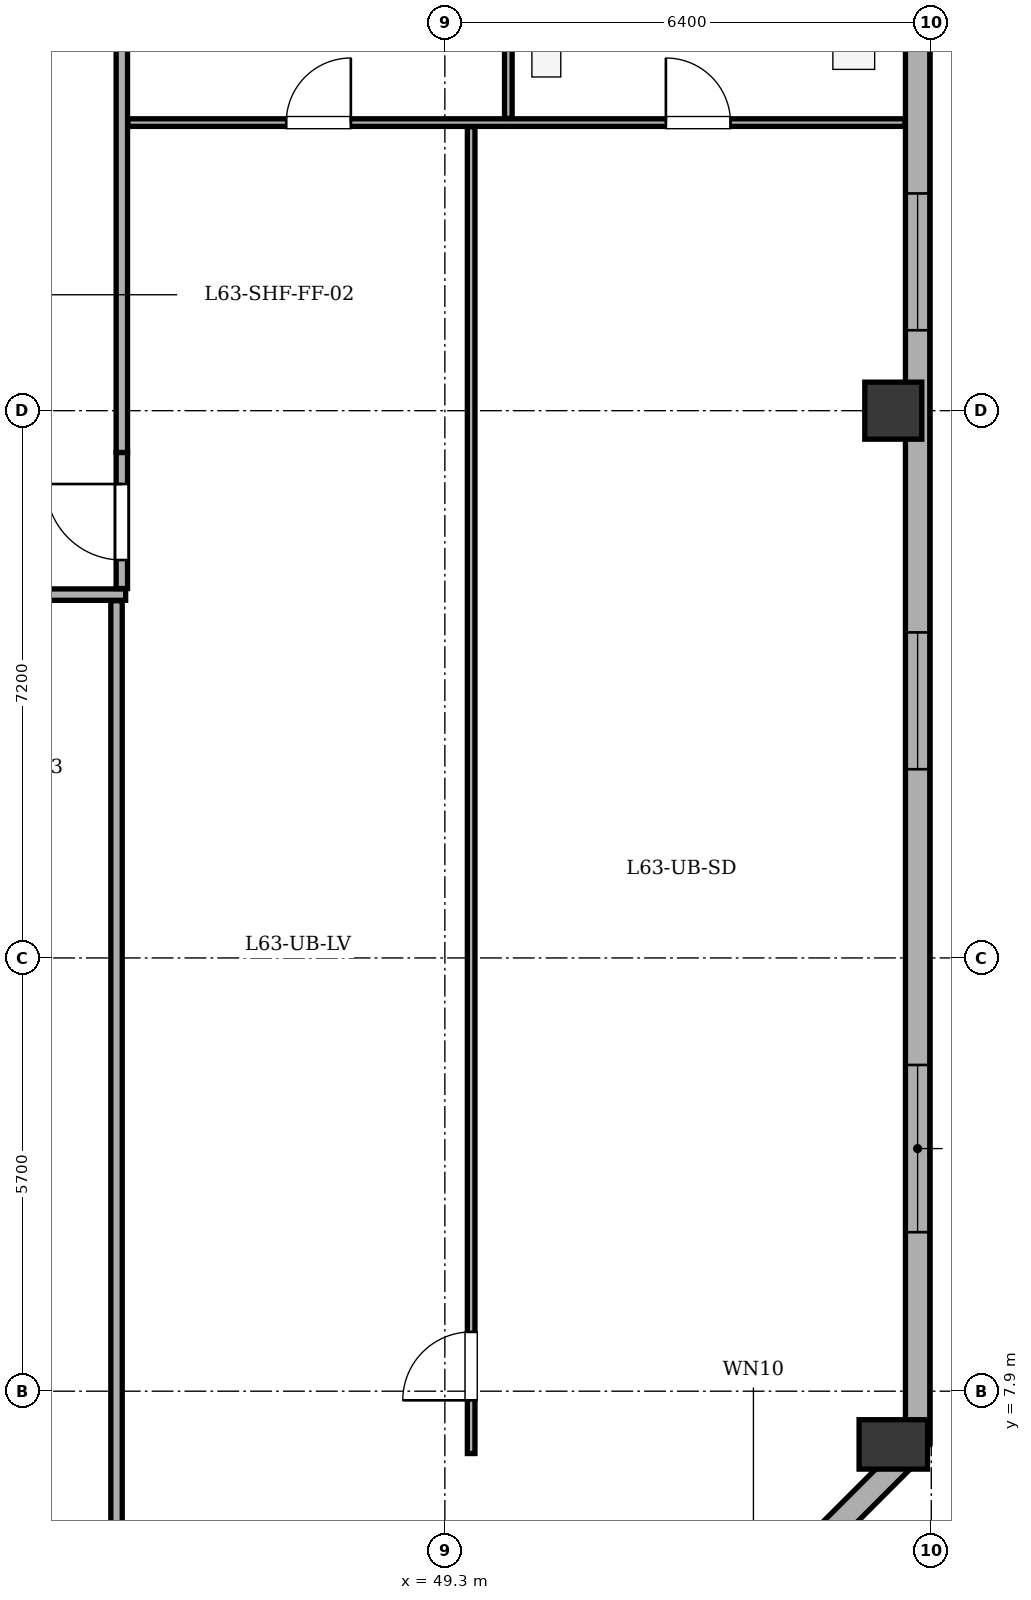
"""IFC4 building model, lengths in metres.
Left out: names, types, materials, properties, quantities, classifications, styles, units other than length and angle.
Written with IfcOpenShell. Run it as: python <this file> out.ifc"""

import sys

from ifc_helpers import new_model, si_unit, direction, frame, frame_2d, origin, origin_2d, place, context, subcontext, project, spatial, rectangle, extrude, element, fill, save


model = new_model("IFC4")
c1 = context("Model", 3, precision=1e-05, world=origin(), true_north=direction((0.0, 1.0)))
c2 = subcontext(c1, "Body", "Model", "MODEL_VIEW")
j1 = project(units=[si_unit("LENGTHUNIT", "METRE"), si_unit("PLANEANGLEUNIT", "RADIAN")], contexts=[c1])
p1 = place(None, origin())
s1 = spatial("IfcSite", under=j1, at=p1, CompositionType="ELEMENT")
p2 = place(p1, origin())
s2 = spatial("IfcBuilding", under=s1, at=p2, CompositionType="ELEMENT")
p3 = place(p2, frame((0.0, 0.0, 241.5)))
s3 = spatial("IfcBuildingStorey", under=s2, at=p3, CompositionType="ELEMENT", Elevation=241.5)
p4 = place(p3, frame((55.2, 7.2, 0.0), z_axis=(0.0, 0.0, 1.0), x_axis=(1.0, 0.0, 0.0)))
e1 = element("IfcColumn", 1, at=p4, inside=s3, PredefinedType="COLUMN", context=c2, shape_type="SweptSolid", body=[
    extrude(rectangle(XDim=0.65, YDim=0.9, at=origin_2d()), origin(), (0.0, 0.0, 1.0), 3.4),
])
p5 = place(p3, frame((55.2, 20.8, 0.0), z_axis=(0.0, 0.0, 1.0), x_axis=(1.0, 0.0, 0.0)))
e2 = element("IfcColumn", 2, at=p5, inside=s3, PredefinedType="COLUMN", context=c2, shape_type="SweptSolid", body=[
    extrude(rectangle(XDim=0.75, YDim=0.75, at=origin_2d()), origin(), (0.0, 0.0, 1.0), 3.4),
])
p6 = place(p3, frame((55.52, 35.0, 0.0), z_axis=(0.0, 0.0, 1.0), x_axis=(0.0, -1.0, 0.0)))
e3 = element("IfcWall", 3, at=p6, inside=s3, PredefinedType="STANDARD", context=c2, shape_type="SweptSolid", body=[
    extrude(rectangle(XDim=27.8, YDim=0.32, at=frame_2d((13.9, 0.0))), origin(), (0.0, 0.0, 1.0), 2.725),
])
p7 = place(p6, frame((2.458, 0.0, 0.75)))
e4 = element("IfcOpeningElement", 4, at=p7, cuts=e3, PredefinedType="OPENING", context=c2, shape_type="SweptSolid", body=[
    extrude(rectangle(XDim=1.8, YDim=1.7, at=frame_2d((0.9, 0.85))), frame((0.0, 0.17, 0.0), z_axis=(0.0, -1.0, 0.0), x_axis=(1.0, 0.0, 0.0)), (0.0, 0.0, 1.0), 0.34),
])
p8 = place(p6, frame((11.342, 0.0, 0.75)))
e5 = element("IfcOpeningElement", 5, at=p8, cuts=e3, PredefinedType="OPENING", context=c2, shape_type="SweptSolid", body=[
    extrude(rectangle(XDim=1.8, YDim=1.7, at=frame_2d((0.9, 0.85))), frame((0.0, 0.17, 0.0), z_axis=(0.0, -1.0, 0.0), x_axis=(1.0, 0.0, 0.0)), (0.0, 0.0, 1.0), 0.34),
])
p9 = place(p6, frame((17.117, 0.0, 0.75)))
e6 = element("IfcOpeningElement", 6, at=p9, cuts=e3, PredefinedType="OPENING", context=c2, shape_type="SweptSolid", body=[
    extrude(rectangle(XDim=1.8, YDim=1.7, at=frame_2d((0.9, 0.85))), frame((0.0, 0.17, 0.0), z_axis=(0.0, -1.0, 0.0), x_axis=(1.0, 0.0, 0.0)), (0.0, 0.0, 1.0), 0.34),
])
p10 = place(p6, frame((22.808, 0.0, 0.75)))
e7 = element("IfcOpeningElement", 7, at=p10, cuts=e3, PredefinedType="OPENING", context=c2, shape_type="SweptSolid", body=[
    extrude(rectangle(XDim=2.2, YDim=1.7, at=frame_2d((1.1, 0.85))), frame((0.0, 0.17, 0.0), z_axis=(0.0, -1.0, 0.0), x_axis=(1.0, 0.0, 0.0)), (0.0, 0.0, 1.0), 0.34),
])
p11 = place(p3, frame((55.52, 7.2, 0.0), z_axis=(0.0, 0.0, 1.0), x_axis=(-0.707106781187, -0.707106781187, 0.0)))
e8 = element("IfcWall", 8, at=p11, inside=s3, PredefinedType="STANDARD", context=c2, shape_type="SweptSolid", body=[
    extrude(rectangle(XDim=6.11, YDim=0.32, at=frame_2d((3.055, 0.0))), origin(), (0.0, 0.0, 1.0), 2.725),
])
p12 = place(p11, frame((2.355, 0.0, 0.75)))
e9 = element("IfcOpeningElement", 9, at=p12, cuts=e8, PredefinedType="OPENING", context=c2, shape_type="SweptSolid", body=[
    extrude(rectangle(XDim=1.4, YDim=1.65, at=frame_2d((0.7, 0.825))), frame((0.0, 0.17, 0.0), z_axis=(0.0, -1.0, 0.0), x_axis=(1.0, 0.0, 0.0)), (0.0, 0.0, 1.0), 0.34),
])
p13 = place(p3, frame((15.08, 18.38, 0.0), z_axis=(0.0, 0.0, 1.0), x_axis=(1.0, 0.0, 0.0)))
e10 = element("IfcWall", 10, at=p13, inside=s3, PredefinedType="PARTITIONING", context=c2, shape_type="SweptSolid", body=[
    extrude(rectangle(XDim=30.02, YDim=0.15, at=frame_2d((15.01, 0.0))), origin(), (0.0, 0.0, 1.0), 3.1),
])
p14 = place(p13, frame((14.51, 0.0, 0.0)))
e11 = element("IfcOpeningElement", 11, at=p14, cuts=e10, PredefinedType="OPENING", context=c2, shape_type="SweptSolid", body=[
    extrude(rectangle(XDim=1.0, YDim=2.1, at=frame_2d((0.5, 1.05))), frame((0.0, 0.085, 0.0), z_axis=(0.0, -1.0, 0.0), x_axis=(1.0, 0.0, 0.0)), (0.0, 0.0, 1.0), 0.17),
])
p15 = place(p3, frame((44.98, 3.045, 0.0), z_axis=(0.0, 0.0, 1.0), x_axis=(0.0, 1.0, 0.0)))
e12 = element("IfcWall", 12, at=p15, inside=s3, PredefinedType="PARTITIONING", context=c2, shape_type="SweptSolid", body=[
    extrude(rectangle(XDim=15.255, YDim=0.15, at=frame_2d((7.627, 0.0))), origin(), (0.0, 0.0, 1.0), 2.725),
])
p16 = place(p3, frame((45.05, 18.46, 0.0), z_axis=(0.0, 0.0, 1.0), x_axis=(0.0, 1.0, 0.0)))
e13 = element("IfcWall", 13, at=p16, inside=s3, PredefinedType="PARTITIONING", context=c2, shape_type="SweptSolid", body=[
    extrude(rectangle(XDim=1.79, YDim=0.15, at=frame_2d((0.895, 0.0))), origin(), (0.0, 0.0, 1.0), 2.725),
])
p17 = place(p16, frame((0.375, 0.0, 0.0)))
e14 = element("IfcOpeningElement", 14, at=p17, cuts=e13, PredefinedType="OPENING", context=c2, shape_type="SweptSolid", body=[
    extrude(rectangle(XDim=1.0, YDim=2.1, at=frame_2d((0.5, 1.05))), frame((0.0, 0.085, 0.0), z_axis=(0.0, -1.0, 0.0), x_axis=(1.0, 0.0, 0.0)), (0.0, 0.0, 1.0), 0.17),
])
p18 = place(p3, frame((45.05, 20.25, 0.0), z_axis=(0.0, 0.0, 1.0), x_axis=(0.0, 1.0, 0.0)))
e15 = element("IfcWall", 15, at=p18, inside=s3, PredefinedType="PARTITIONING", context=c2, shape_type="SweptSolid", body=[
    extrude(rectangle(XDim=13.9, YDim=0.15, at=frame_2d((6.95, 0.0))), origin(), (0.0, 0.0, 1.0), 2.725),
])
p19 = place(p3, frame((45.13, 24.59, 0.0), z_axis=(0.0, 0.0, 1.0), x_axis=(1.0, 0.0, 0.0)))
e16 = element("IfcWall", 16, at=p19, inside=s3, PredefinedType="PARTITIONING", context=c2, shape_type="SweptSolid", body=[
    extrude(rectangle(XDim=10.225, YDim=0.1, at=frame_2d((5.113, 0.0))), origin(), (0.0, 0.0, 1.0), 3.1),
])
p20 = place(p19, frame((2.083, 0.0, 0.0)))
e17 = element("IfcOpeningElement", 17, at=p20, cuts=e16, PredefinedType="OPENING", context=c2, shape_type="SweptSolid", body=[
    extrude(rectangle(XDim=0.85, YDim=2.05, at=frame_2d((0.425, 1.025))), frame((0.0, 0.06, 0.0), z_axis=(0.0, -1.0, 0.0), x_axis=(1.0, 0.0, 0.0)), (0.0, 0.0, 1.0), 0.12),
])
p21 = place(p19, frame((7.078, 0.0, 0.0)))
e18 = element("IfcOpeningElement", 18, at=p21, cuts=e16, PredefinedType="OPENING", context=c2, shape_type="SweptSolid", body=[
    extrude(rectangle(XDim=0.85, YDim=2.05, at=frame_2d((0.425, 1.025))), frame((0.0, 0.06, 0.0), z_axis=(0.0, -1.0, 0.0), x_axis=(1.0, 0.0, 0.0)), (0.0, 0.0, 1.0), 0.12),
])
p22 = place(p3, frame((49.646, 7.08, 0.0), z_axis=(0.0, 0.0, 1.0), x_axis=(0.0, 1.0, 0.0)))
e19 = element("IfcWall", 19, at=p22, inside=s3, PredefinedType="PARTITIONING", context=c2, shape_type="SweptSolid", body=[
    extrude(rectangle(XDim=17.455, YDim=0.1, at=frame_2d((8.728, 0.0))), origin(), (0.0, 0.0, 1.0), 3.1),
])
p23 = place(p22, frame((0.7, 0.0, 0.0)))
e20 = element("IfcOpeningElement", 20, at=p23, cuts=e19, PredefinedType="OPENING", context=c2, shape_type="SweptSolid", body=[
    extrude(rectangle(XDim=0.9, YDim=2.05, at=frame_2d((0.45, 1.025))), frame((0.0, 0.06, 0.0), z_axis=(0.0, -1.0, 0.0), x_axis=(1.0, 0.0, 0.0)), (0.0, 0.0, 1.0), 0.12),
])
p24 = place(p3, frame((50.135, 24.645, 0.0), z_axis=(0.0, 0.0, 1.0), x_axis=(0.0, 1.0, 0.0)))
e21 = element("IfcWall", 21, at=p24, inside=s3, PredefinedType="PARTITIONING", context=c2, shape_type="SweptSolid", body=[
    extrude(rectangle(XDim=2.475, YDim=0.1, at=frame_2d((1.238, 0.0))), origin(), (0.0, 0.0, 1.0), 3.1),
])
p25 = place(p8, origin())
e22 = element("IfcWindow", 22, at=p25, inside=s3, PartitioningType="SINGLE_PANEL", PredefinedType="WINDOW", context=c2, shape_type="SweptSolid", body=[
    extrude(rectangle(XDim=1.8, YDim=1.7, at=frame_2d((0.9, 0.85))), frame((0.0, -0.01, 0.0), z_axis=(0.0, -1.0, 0.0), x_axis=(1.0, 0.0, 0.0)), (0.0, 0.0, 1.0), 0.06),
])
fill(e5, e22)
p26 = place(p9, origin())
e23 = element("IfcWindow", 23, at=p26, inside=s3, PartitioningType="SINGLE_PANEL", PredefinedType="WINDOW", context=c2, shape_type="SweptSolid", body=[
    extrude(rectangle(XDim=1.8, YDim=1.7, at=frame_2d((0.9, 0.85))), frame((0.0, -0.01, 0.0), z_axis=(0.0, -1.0, 0.0), x_axis=(1.0, 0.0, 0.0)), (0.0, 0.0, 1.0), 0.06),
])
fill(e6, e23)
p27 = place(p10, origin())
e24 = element("IfcWindow", 24, at=p27, inside=s3, PartitioningType="SINGLE_PANEL", PredefinedType="WINDOW", context=c2, shape_type="SweptSolid", body=[
    extrude(rectangle(XDim=2.2, YDim=1.7, at=frame_2d((1.1, 0.85))), frame((0.0, -0.01, 0.0), z_axis=(0.0, -1.0, 0.0), x_axis=(1.0, 0.0, 0.0)), (0.0, 0.0, 1.0), 0.06),
])
fill(e7, e24)
p28 = place(p17, origin())
e25 = element("IfcDoor", 25, at=p28, inside=s3, OperationType="SINGLE_SWING_RIGHT", PredefinedType="DOOR", context=c2, shape_type="SweptSolid", body=[
    extrude(rectangle(XDim=1.0, YDim=2.1, at=frame_2d((0.5, 1.05))), frame((0.0, 0.025, 0.0), z_axis=(0.0, -1.0, 0.0), x_axis=(1.0, 0.0, 0.0)), (0.0, 0.0, 1.0), 0.05),
])
fill(e14, e25)
p29 = place(p23, origin())
e26 = element("IfcDoor", 26, at=p29, inside=s3, OperationType="SINGLE_SWING_LEFT", PredefinedType="DOOR", context=c2, shape_type="SweptSolid", body=[
    extrude(rectangle(XDim=0.9, YDim=2.05, at=frame_2d((0.45, 1.025))), frame((0.0, 0.025, 0.0), z_axis=(0.0, -1.0, 0.0), x_axis=(1.0, 0.0, 0.0)), (0.0, 0.0, 1.0), 0.05),
])
fill(e20, e26)
p30 = place(p20, origin())
e27 = element("IfcDoor", 27, at=p30, inside=s3, OperationType="SINGLE_SWING_RIGHT", PredefinedType="DOOR", context=c2, shape_type="SweptSolid", body=[
    extrude(rectangle(XDim=0.85, YDim=2.05, at=frame_2d((0.425, 1.025))), frame((0.0, 0.025, 0.0), z_axis=(0.0, -1.0, 0.0), x_axis=(1.0, 0.0, 0.0)), (0.0, 0.0, 1.0), 0.05),
])
fill(e17, e27)
p31 = place(p21, origin())
e28 = element("IfcDoor", 28, at=p31, inside=s3, OperationType="SINGLE_SWING_LEFT", PredefinedType="DOOR", context=c2, shape_type="SweptSolid", body=[
    extrude(rectangle(XDim=0.85, YDim=2.05, at=frame_2d((0.425, 1.025))), frame((0.0, 0.025, 0.0), z_axis=(0.0, -1.0, 0.0), x_axis=(1.0, 0.0, 0.0)), (0.0, 0.0, 1.0), 0.05),
])
fill(e18, e28)
save(model, sys.argv[1])
